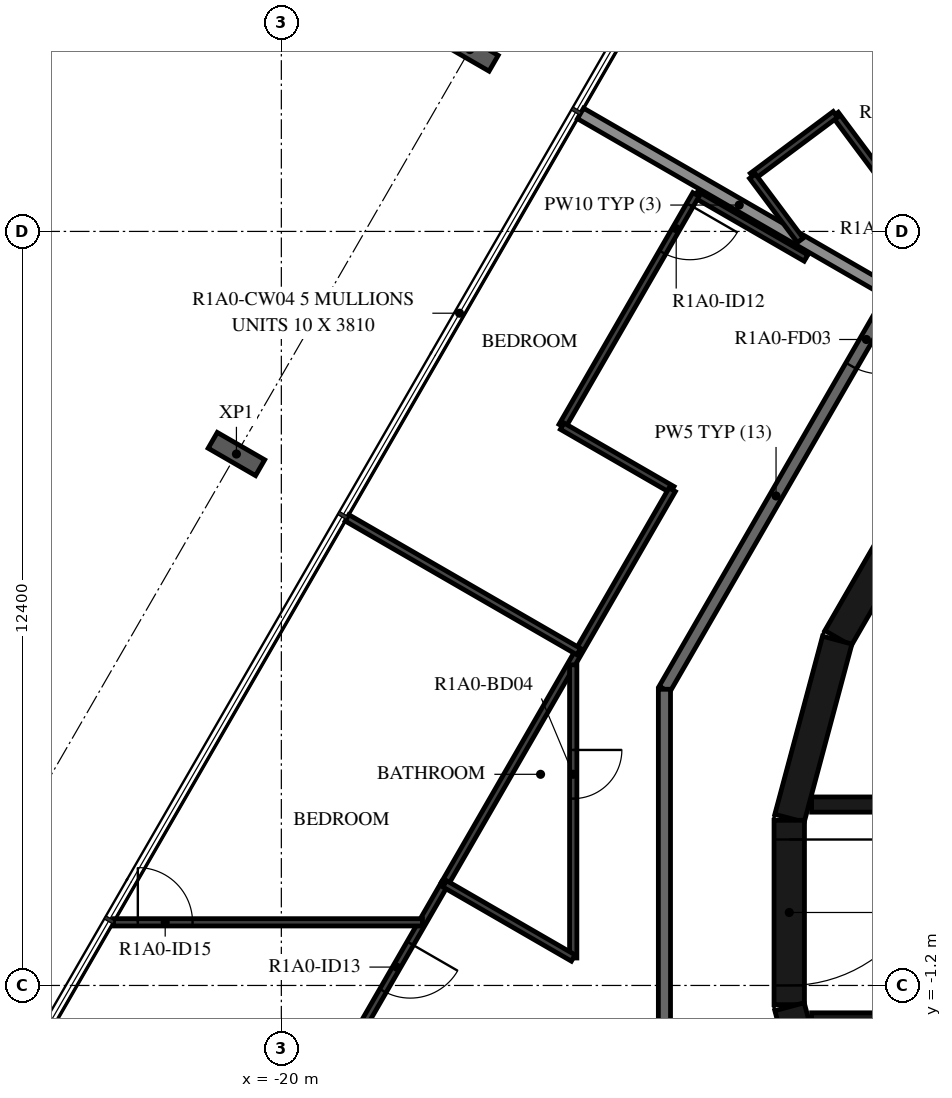
"""IFC4 building model, lengths in metres.
Left out: names, types, materials, properties, quantities, classifications, styles, units other than length and angle.
Written with IfcOpenShell. Run it as: python <this file> out.ifc"""

import sys

from ifc_helpers import new_model, si_unit, direction, frame, frame_2d, origin, origin_2d, place, context, subcontext, project, spatial, rectangle, i_section, extrude, element, fill, save


model = new_model("IFC4")
c1 = context("Model", 3, precision=1e-05, world=origin(), true_north=direction((0.0, 1.0)))
c2 = subcontext(c1, "Body", "Model", "MODEL_VIEW")
j1 = project(units=[si_unit("LENGTHUNIT", "METRE"), si_unit("PLANEANGLEUNIT", "RADIAN")], contexts=[c1])
p1 = place(None, origin())
s1 = spatial("IfcSite", under=j1, at=p1, CompositionType="ELEMENT")
p2 = place(p1, origin())
s2 = spatial("IfcBuilding", under=s1, at=p2, CompositionType="ELEMENT")
p3 = place(p2, frame((0.0, 0.0, 38.4)))
s3 = spatial("IfcBuildingStorey", under=s2, at=p3, CompositionType="ELEMENT", Elevation=38.4)
for number, where, z_axis, x_axis in (
    (1, (-16.899, 14.19, -0.45), (0.0, 0.0, 1.0), (0.5, 0.866, 0.0)),
    (2, (-20.739, 7.539, -0.45), (0.0, 0.0, 1.0), (0.5, 0.866, 0.0)),
):
    element("IfcColumn", number, at=place(p3, frame(where, z_axis=z_axis, x_axis=x_axis)), inside=s3, PredefinedType="COLUMN", context=c2, shape_type="SweptSolid", body=[
        extrude(i_section(OverallWidth=0.3, OverallDepth=0.9, WebThickness=0.019, FlangeThickness=0.035, FilletRadius=0.03, at=origin_2d()), origin(), (0.0, 0.0, 1.0), 3.57),
    ])
for number, where, z_axis, x_axis in (
    (3, (-9.329, 7.137, 0.0), (0.0, 0.0, 1.0), (-0.5, -0.866, 0.0)),
    (4, (-10.858, 4.479, 0.0), (0.0, 0.0, 1.0), (-0.259, -0.966, 0.0)),
):
    element("IfcWall", number, at=place(p3, frame(where, z_axis=z_axis, x_axis=x_axis)), inside=s3, PredefinedType="SHEAR", context=c2, shape_type="SweptSolid", body=[
        extrude(rectangle(XDim=3.033, YDim=0.5, at=frame_2d((1.516, 0.0))), origin(), (0.0, 0.0, 1.0), 3.12),
    ])
p4 = place(p3, frame((-11.647, 1.516, 0.0), z_axis=(0.0, 0.0, 1.0), x_axis=(0.0, -1.0, 0.0)))
e5 = element("IfcWall", 5, at=p4, inside=s3, PredefinedType="SHEAR", context=c2, shape_type="SweptSolid", body=[
    extrude(rectangle(XDim=3.033, YDim=0.5, at=frame_2d((1.516, 0.0))), origin(), (0.0, 0.0, 1.0), 3.12),
])
p5 = place(p4, frame((0.316, 0.0, 0.0)))
e6 = element("IfcOpeningElement", 6, at=p5, cuts=e5, PredefinedType="OPENING", context=c2, shape_type="SweptSolid", body=[
    extrude(rectangle(XDim=2.4, YDim=2.1, at=frame_2d((1.2, 1.05))), frame((0.0, 0.26, 0.0), z_axis=(0.0, -1.0, 0.0), x_axis=(1.0, 0.0, 0.0)), (0.0, 0.0, 1.0), 0.52),
])
p6 = place(p3, frame((-11.643, -1.55, 0.0), z_axis=(0.0, 0.0, 1.0), x_axis=(0.258734743916, -0.965948410781, 0.0)))
e7 = element("IfcWall", 7, at=p6, inside=s3, PredefinedType="SHEAR", context=c2, shape_type="SweptSolid", body=[
    extrude(rectangle(XDim=3.033, YDim=0.5, at=frame_2d((1.516, 0.0))), origin(), (0.0, 0.0, 1.0), 3.12),
])
p7 = place(p6, frame((1.066, 0.0, 0.0)))
e8 = element("IfcOpeningElement", 8, at=p7, cuts=e7, PredefinedType="OPENING", context=c2, shape_type="SweptSolid", body=[
    extrude(rectangle(XDim=0.9, YDim=2.1, at=frame_2d((0.45, 1.05))), frame((0.0, 0.26, 0.0), z_axis=(0.0, -1.0, 0.0), x_axis=(1.0, 0.0, 0.0)), (0.0, 0.0, 1.0), 0.52),
])
p8 = place(p3, frame((-11.28, 1.775, 0.0), z_axis=(0.0, 0.0, 1.0), x_axis=(1.0, 0.0, 0.0)))
e9 = element("IfcWall", 9, at=p8, inside=s3, PredefinedType="SHEAR", context=c2, shape_type="SweptSolid", body=[
    extrude(rectangle(XDim=14.38, YDim=0.25, at=frame_2d((7.19, 0.0))), origin(), (0.0, 0.0, 1.0), 3.12),
])
p9 = place(p8, frame((2.13, 0.0, 0.0)))
e10 = element("IfcOpeningElement", 10, at=p9, cuts=e9, PredefinedType="OPENING", context=c2, shape_type="SweptSolid", body=[
    extrude(rectangle(XDim=1.1, YDim=2.1, at=frame_2d((0.55, 1.05))), frame((0.0, 0.135, 0.0), z_axis=(0.0, -1.0, 0.0), x_axis=(1.0, 0.0, 0.0)), (0.0, 0.0, 1.0), 0.27),
])
p10 = place(p8, frame((4.28, 0.0, 0.0)))
e11 = element("IfcOpeningElement", 11, at=p10, cuts=e9, PredefinedType="OPENING", context=c2, shape_type="SweptSolid", body=[
    extrude(rectangle(XDim=1.1, YDim=2.1, at=frame_2d((0.55, 1.05))), frame((0.0, 0.135, 0.0), z_axis=(0.0, -1.0, 0.0), x_axis=(1.0, 0.0, 0.0)), (0.0, 0.0, 1.0), 0.27),
])
p11 = place(p8, frame((6.43, 0.0, 0.0)))
e12 = element("IfcOpeningElement", 12, at=p11, cuts=e9, PredefinedType="OPENING", context=c2, shape_type="SweptSolid", body=[
    extrude(rectangle(XDim=1.1, YDim=2.1, at=frame_2d((0.55, 1.05))), frame((0.0, 0.135, 0.0), z_axis=(0.0, -1.0, 0.0), x_axis=(1.0, 0.0, 0.0)), (0.0, 0.0, 1.0), 0.27),
])
p12 = place(p8, frame((8.58, 0.0, 0.0)))
e13 = element("IfcOpeningElement", 13, at=p12, cuts=e9, PredefinedType="OPENING", context=c2, shape_type="SweptSolid", body=[
    extrude(rectangle(XDim=1.1, YDim=2.1, at=frame_2d((0.55, 1.05))), frame((0.0, 0.135, 0.0), z_axis=(0.0, -1.0, 0.0), x_axis=(1.0, 0.0, 0.0)), (0.0, 0.0, 1.0), 0.27),
])
p13 = place(p8, frame((10.83, 0.0, 0.0)))
e14 = element("IfcOpeningElement", 14, at=p13, cuts=e9, PredefinedType="OPENING", context=c2, shape_type="SweptSolid", body=[
    extrude(rectangle(XDim=0.9, YDim=2.1, at=frame_2d((0.45, 1.05))), frame((0.0, 0.135, 0.0), z_axis=(0.0, -1.0, 0.0), x_axis=(1.0, 0.0, 0.0)), (0.0, 0.0, 1.0), 0.27),
])
p14 = place(p8, frame((12.98, 0.0, 0.0)))
e15 = element("IfcOpeningElement", 15, at=p14, cuts=e9, PredefinedType="OPENING", context=c2, shape_type="SweptSolid", body=[
    extrude(rectangle(XDim=0.9, YDim=2.1, at=frame_2d((0.45, 1.05))), frame((0.0, 0.135, 0.0), z_axis=(0.0, -1.0, 0.0), x_axis=(1.0, 0.0, 0.0)), (0.0, 0.0, 1.0), 0.27),
])
p15 = place(p3, frame((-11.28, -1.775, 0.0), z_axis=(0.0, 0.0, 1.0), x_axis=(1.0, 0.0, 0.0)))
e16 = element("IfcWall", 16, at=p15, inside=s3, PredefinedType="SHEAR", context=c2, shape_type="SweptSolid", body=[
    extrude(rectangle(XDim=14.38, YDim=0.25, at=frame_2d((7.19, 0.0))), origin(), (0.0, 0.0, 1.0), 3.12),
])
p16 = place(p15, frame((9.755, 0.0, 0.0)))
e17 = element("IfcOpeningElement", 17, at=p16, cuts=e16, PredefinedType="OPENING", context=c2, shape_type="SweptSolid", body=[
    extrude(rectangle(XDim=0.9, YDim=2.1, at=frame_2d((0.45, 1.05))), frame((0.0, 0.135, 0.0), z_axis=(0.0, -1.0, 0.0), x_axis=(1.0, 0.0, 0.0)), (0.0, 0.0, 1.0), 0.27),
])
p17 = place(p3, frame((-10.029, 10.029, 0.0), z_axis=(0.0, 0.0, 1.0), x_axis=(-0.500001669485, -0.866024439905, 0.0)))
e18 = element("IfcWall", 18, at=p17, inside=s3, PredefinedType="STANDARD", context=c2, shape_type="SweptSolid", body=[
    extrude(rectangle(XDim=7.342, YDim=0.2, at=frame_2d((3.671, 0.0))), origin(), (0.0, 0.0, 1.0), 3.12),
])
p18 = place(p17, frame((0.2, 0.0, 0.0)))
e19 = element("IfcOpeningElement", 19, at=p18, cuts=e18, PredefinedType="OPENING", context=c2, shape_type="SweptSolid", body=[
    extrude(rectangle(XDim=1.0, YDim=2.1, at=frame_2d((0.5, 1.05))), frame((0.0, 0.11, 0.0), z_axis=(0.0, -1.0, 0.0), x_axis=(1.0, 0.0, 0.0)), (0.0, 0.0, 1.0), 0.22),
])
p19 = place(p3, frame((-13.7, 3.671, 0.0), z_axis=(0.0, 0.0, 1.0), x_axis=(0.0, -1.0, 0.0)))
e20 = element("IfcWall", 20, at=p19, inside=s3, PredefinedType="STANDARD", context=c2, shape_type="SweptSolid", body=[
    extrude(rectangle(XDim=7.342, YDim=0.2, at=frame_2d((3.671, 0.0))), origin(), (0.0, 0.0, 1.0), 3.12),
])
p20 = place(p3, frame((-15.08, 13.14, 0.0), z_axis=(0.0, 0.0, 1.0), x_axis=(0.86603112331, -0.49999009336, 0.0)))
e21 = element("IfcWall", 21, at=p20, inside=s3, PredefinedType="STANDARD", context=c2, shape_type="SweptSolid", body=[
    extrude(rectangle(XDim=6.027, YDim=0.2, at=frame_2d((3.014, 0.0))), origin(), (0.0, 0.0, 1.0), 2.73),
])
p21 = place(p3, frame((-9.92, 11.824, 0.0), z_axis=(0.0, 0.0, 1.0), x_axis=(-0.597853402964, 0.801605456921, 0.0)))
e22 = element("IfcWall", 22, at=p21, inside=s3, PredefinedType="PARTITIONING", context=c2, shape_type="SweptSolid", body=[
    extrude(rectangle(XDim=1.621, YDim=0.12, at=frame_2d((0.811, 0.0))), origin(), (0.0, 0.0, 1.0), 3.12),
])
p22 = place(p3, frame((-10.889, 13.124, 0.0), z_axis=(0.0, 0.0, 1.0), x_axis=(-0.801616976804, -0.597837956724, 0.0)))
e23 = element("IfcWall", 23, at=p22, inside=s3, PredefinedType="PARTITIONING", context=c2, shape_type="SweptSolid", body=[
    extrude(rectangle(XDim=1.7, YDim=0.12, at=frame_2d((0.85, 0.0))), origin(), (0.0, 0.0, 1.0), 3.12),
])
p23 = place(p3, frame((-12.252, 12.107, 0.0), z_axis=(0.0, 0.0, 1.0), x_axis=(0.597827926538, -0.801624457119, 0.0)))
e24 = element("IfcWall", 24, at=p23, inside=s3, PredefinedType="PARTITIONING", context=c2, shape_type="SweptSolid", body=[
    extrude(rectangle(XDim=1.314, YDim=0.12, at=frame_2d((0.657, 0.0))), origin(), (0.0, 0.0, 1.0), 3.12),
])
p24 = place(p3, frame((-11.372, 10.763, 0.0), z_axis=(0.0, 0.0, 1.0), x_axis=(-0.866041603473, 0.499971940267, 0.0)))
e25 = element("IfcWall", 25, at=p24, inside=s3, PredefinedType="PARTITIONING", context=c2, shape_type="SweptSolid", body=[
    extrude(rectangle(XDim=2.089, YDim=0.12, at=frame_2d((1.045, 0.0))), origin(), (0.0, 0.0, 1.0), 3.12),
])
p25 = place(p3, frame((-13.181, 11.808, 0.0), z_axis=(0.0, 0.0, 1.0), x_axis=(-0.50002983664, -0.866008176907, 0.0)))
e26 = element("IfcWall", 26, at=p25, inside=s3, PredefinedType="PARTITIONING", context=c2, shape_type="SweptSolid", body=[
    extrude(rectangle(XDim=4.4, YDim=0.12, at=frame_2d((2.2, 0.0))), origin(), (0.0, 0.0, 1.0), 3.12),
])
p26 = place(p25, frame((0.2, 0.0, 0.0)))
e27 = element("IfcOpeningElement", 27, at=p26, cuts=e26, PredefinedType="OPENING", context=c2, shape_type="SweptSolid", body=[
    extrude(rectangle(XDim=0.9, YDim=2.1, at=frame_2d((0.45, 1.05))), frame((0.0, 0.07, 0.0), z_axis=(0.0, -1.0, 0.0), x_axis=(1.0, 0.0, 0.0)), (0.0, 0.0, 1.0), 0.14),
])
p27 = place(p3, frame((-15.382, 7.997, 0.0), z_axis=(0.0, 0.0, 1.0), x_axis=(0.866041603473, -0.499971940267, 0.0)))
e28 = element("IfcWall", 28, at=p27, inside=s3, PredefinedType="PARTITIONING", context=c2, shape_type="SweptSolid", body=[
    extrude(rectangle(XDim=2.089, YDim=0.12, at=frame_2d((1.045, 0.0))), origin(), (0.0, 0.0, 1.0), 3.12),
])
p28 = place(p3, frame((-13.572, 6.953, 0.0), z_axis=(0.0, 0.0, 1.0), x_axis=(-0.499981332661, -0.866036181109, 0.0)))
e29 = element("IfcWall", 29, at=p28, inside=s3, PredefinedType="PARTITIONING", context=c2, shape_type="SweptSolid", body=[
    extrude(rectangle(XDim=7.483, YDim=0.12, at=frame_2d((3.742, 0.0))), origin(), (0.0, 0.0, 1.0), 3.12),
])
p29 = place(p3, frame((-17.313, 0.472, 0.0), z_axis=(0.0, 0.0, 1.0), x_axis=(-0.499999047218, -0.866025953873, 0.0)))
e30 = element("IfcWall", 30, at=p29, inside=s3, PredefinedType="PARTITIONING", context=c2, shape_type="SweptSolid", body=[
    extrude(rectangle(XDim=11.639, YDim=0.12, at=frame_2d((5.82, 0.0))), origin(), (0.0, 0.0, 1.0), 3.12),
])
p30 = place(p29, frame((1.132, 0.0, 0.0)))
e31 = element("IfcOpeningElement", 31, at=p30, cuts=e30, PredefinedType="OPENING", context=c2, shape_type="SweptSolid", body=[
    extrude(rectangle(XDim=0.9, YDim=2.1, at=frame_2d((0.45, 1.05))), frame((0.0, 0.07, 0.0), z_axis=(0.0, -1.0, 0.0), x_axis=(1.0, 0.0, 0.0)), (0.0, 0.0, 1.0), 0.14),
])
p31 = place(p29, frame((8.083, 0.0, 0.0)))
e32 = element("IfcOpeningElement", 32, at=p31, cuts=e30, PredefinedType="OPENING", context=c2, shape_type="SweptSolid", body=[
    extrude(rectangle(XDim=0.9, YDim=2.1, at=frame_2d((0.45, 1.05))), frame((0.0, 0.07, 0.0), z_axis=(0.0, -1.0, 0.0), x_axis=(1.0, 0.0, 0.0)), (0.0, 0.0, 1.0), 0.14),
])
p32 = place(p3, frame((-15.2, 4.073, 0.0), z_axis=(0.0, 0.0, 1.0), x_axis=(0.0, -1.0, 0.0)))
e33 = element("IfcWall", 33, at=p32, inside=s3, PredefinedType="PARTITIONING", context=c2, shape_type="SweptSolid", body=[
    extrude(rectangle(XDim=4.821, YDim=0.12, at=frame_2d((2.411, 0.0))), origin(), (0.0, 0.0, 1.0), 3.12),
])
p33 = place(p32, frame((1.4, 0.0, 0.0)))
e34 = element("IfcOpeningElement", 34, at=p33, cuts=e33, PredefinedType="OPENING", context=c2, shape_type="SweptSolid", body=[
    extrude(rectangle(XDim=0.8, YDim=2.1, at=frame_2d((0.4, 1.05))), frame((0.0, 0.07, 0.0), z_axis=(0.0, -1.0, 0.0), x_axis=(1.0, 0.0, 0.0)), (0.0, 0.0, 1.0), 0.14),
])
p34 = place(p3, frame((-15.2, -0.748, 0.0), z_axis=(0.0, 0.0, 1.0), x_axis=(-0.866030657337, 0.49999090047, 0.0)))
e35 = element("IfcWall", 35, at=p34, inside=s3, PredefinedType="PARTITIONING", context=c2, shape_type="SweptSolid", body=[
    extrude(rectangle(XDim=2.44, YDim=0.12, at=frame_2d((1.22, 0.0))), origin(), (0.0, 0.0, 1.0), 3.12),
])
p35 = place(p3, frame((-18.92, 6.49, 0.0), z_axis=(0.0, 0.0, 1.0), x_axis=(0.865994303029, -0.500053864221, 0.0)))
e36 = element("IfcWall", 36, at=p35, inside=s3, PredefinedType="PARTITIONING", context=c2, shape_type="SweptSolid", body=[
    extrude(rectangle(XDim=4.4, YDim=0.12, at=frame_2d((2.2, 0.0))), origin(), (0.0, 0.0, 1.0), 2.73),
])
p36 = place(p3, frame((-22.76, -0.162, 0.0), z_axis=(0.0, 0.0, 1.0), x_axis=(1.0, 0.0, 0.0)))
e37 = element("IfcWall", 37, at=p36, inside=s3, PredefinedType="PARTITIONING", context=c2, shape_type="SweptSolid", body=[
    extrude(rectangle(XDim=5.081, YDim=0.12, at=frame_2d((2.54, 0.0))), origin(), (0.0, 0.0, 1.0), 3.12),
])
p37 = place(p36, frame((0.4, 0.0, 0.0)))
e38 = element("IfcOpeningElement", 38, at=p37, cuts=e37, PredefinedType="OPENING", context=c2, shape_type="SweptSolid", body=[
    extrude(rectangle(XDim=0.9, YDim=2.1, at=frame_2d((0.45, 1.05))), frame((0.0, 0.07, 0.0), z_axis=(0.0, -1.0, 0.0), x_axis=(1.0, 0.0, 0.0)), (0.0, 0.0, 1.0), 0.14),
])
p38 = place(p5, origin())
e39 = element("IfcDoor", 39, at=p38, inside=s3, OperationType="DOUBLE_DOOR_SINGLE_SWING", PredefinedType="DOOR", context=c2, shape_type="SweptSolid", body=[
    extrude(rectangle(XDim=2.4, YDim=2.1, at=frame_2d((1.2, 1.05))), frame((0.0, 0.025, 0.0), z_axis=(0.0, -1.0, 0.0), x_axis=(1.0, 0.0, 0.0)), (0.0, 0.0, 1.0), 0.05),
])
fill(e6, e39)
p39 = place(p18, origin())
e40 = element("IfcDoor", 40, at=p39, inside=s3, OperationType="SINGLE_SWING_LEFT", PredefinedType="DOOR", context=c2, shape_type="SweptSolid", body=[
    extrude(rectangle(XDim=1.0, YDim=2.1, at=frame_2d((0.5, 1.05))), frame((0.0, 0.025, 0.0), z_axis=(0.0, -1.0, 0.0), x_axis=(1.0, 0.0, 0.0)), (0.0, 0.0, 1.0), 0.05),
])
fill(e19, e40)
p40 = place(p26, origin())
e41 = element("IfcDoor", 41, at=p40, inside=s3, OperationType="SINGLE_SWING_LEFT", PredefinedType="DOOR", context=c2, shape_type="SweptSolid", body=[
    extrude(rectangle(XDim=0.9, YDim=2.1, at=frame_2d((0.45, 1.05))), frame((0.0, 0.025, 0.0), z_axis=(0.0, -1.0, 0.0), x_axis=(1.0, 0.0, 0.0)), (0.0, 0.0, 1.0), 0.05),
])
fill(e27, e41)
p41 = place(p33, origin())
e42 = element("IfcDoor", 42, at=p41, inside=s3, OperationType="SINGLE_SWING_RIGHT", PredefinedType="DOOR", context=c2, shape_type="SweptSolid", body=[
    extrude(rectangle(XDim=0.8, YDim=2.1, at=frame_2d((0.4, 1.05))), frame((0.0, 0.025, 0.0), z_axis=(0.0, -1.0, 0.0), x_axis=(1.0, 0.0, 0.0)), (0.0, 0.0, 1.0), 0.05),
])
fill(e34, e42)
p42 = place(p30, origin())
e43 = element("IfcDoor", 43, at=p42, inside=s3, OperationType="SINGLE_SWING_RIGHT", PredefinedType="DOOR", context=c2, shape_type="SweptSolid", body=[
    extrude(rectangle(XDim=0.9, YDim=2.1, at=frame_2d((0.45, 1.05))), frame((0.0, 0.025, 0.0), z_axis=(0.0, -1.0, 0.0), x_axis=(1.0, 0.0, 0.0)), (0.0, 0.0, 1.0), 0.05),
])
fill(e31, e43)
p43 = place(p37, origin())
e44 = element("IfcDoor", 44, at=p43, inside=s3, OperationType="SINGLE_SWING_LEFT", PredefinedType="DOOR", context=c2, shape_type="SweptSolid", body=[
    extrude(rectangle(XDim=0.9, YDim=2.1, at=frame_2d((0.45, 1.05))), frame((0.0, 0.025, 0.0), z_axis=(0.0, -1.0, 0.0), x_axis=(1.0, 0.0, 0.0)), (0.0, 0.0, 1.0), 0.05),
])
fill(e38, e44)
save(model, sys.argv[1])
